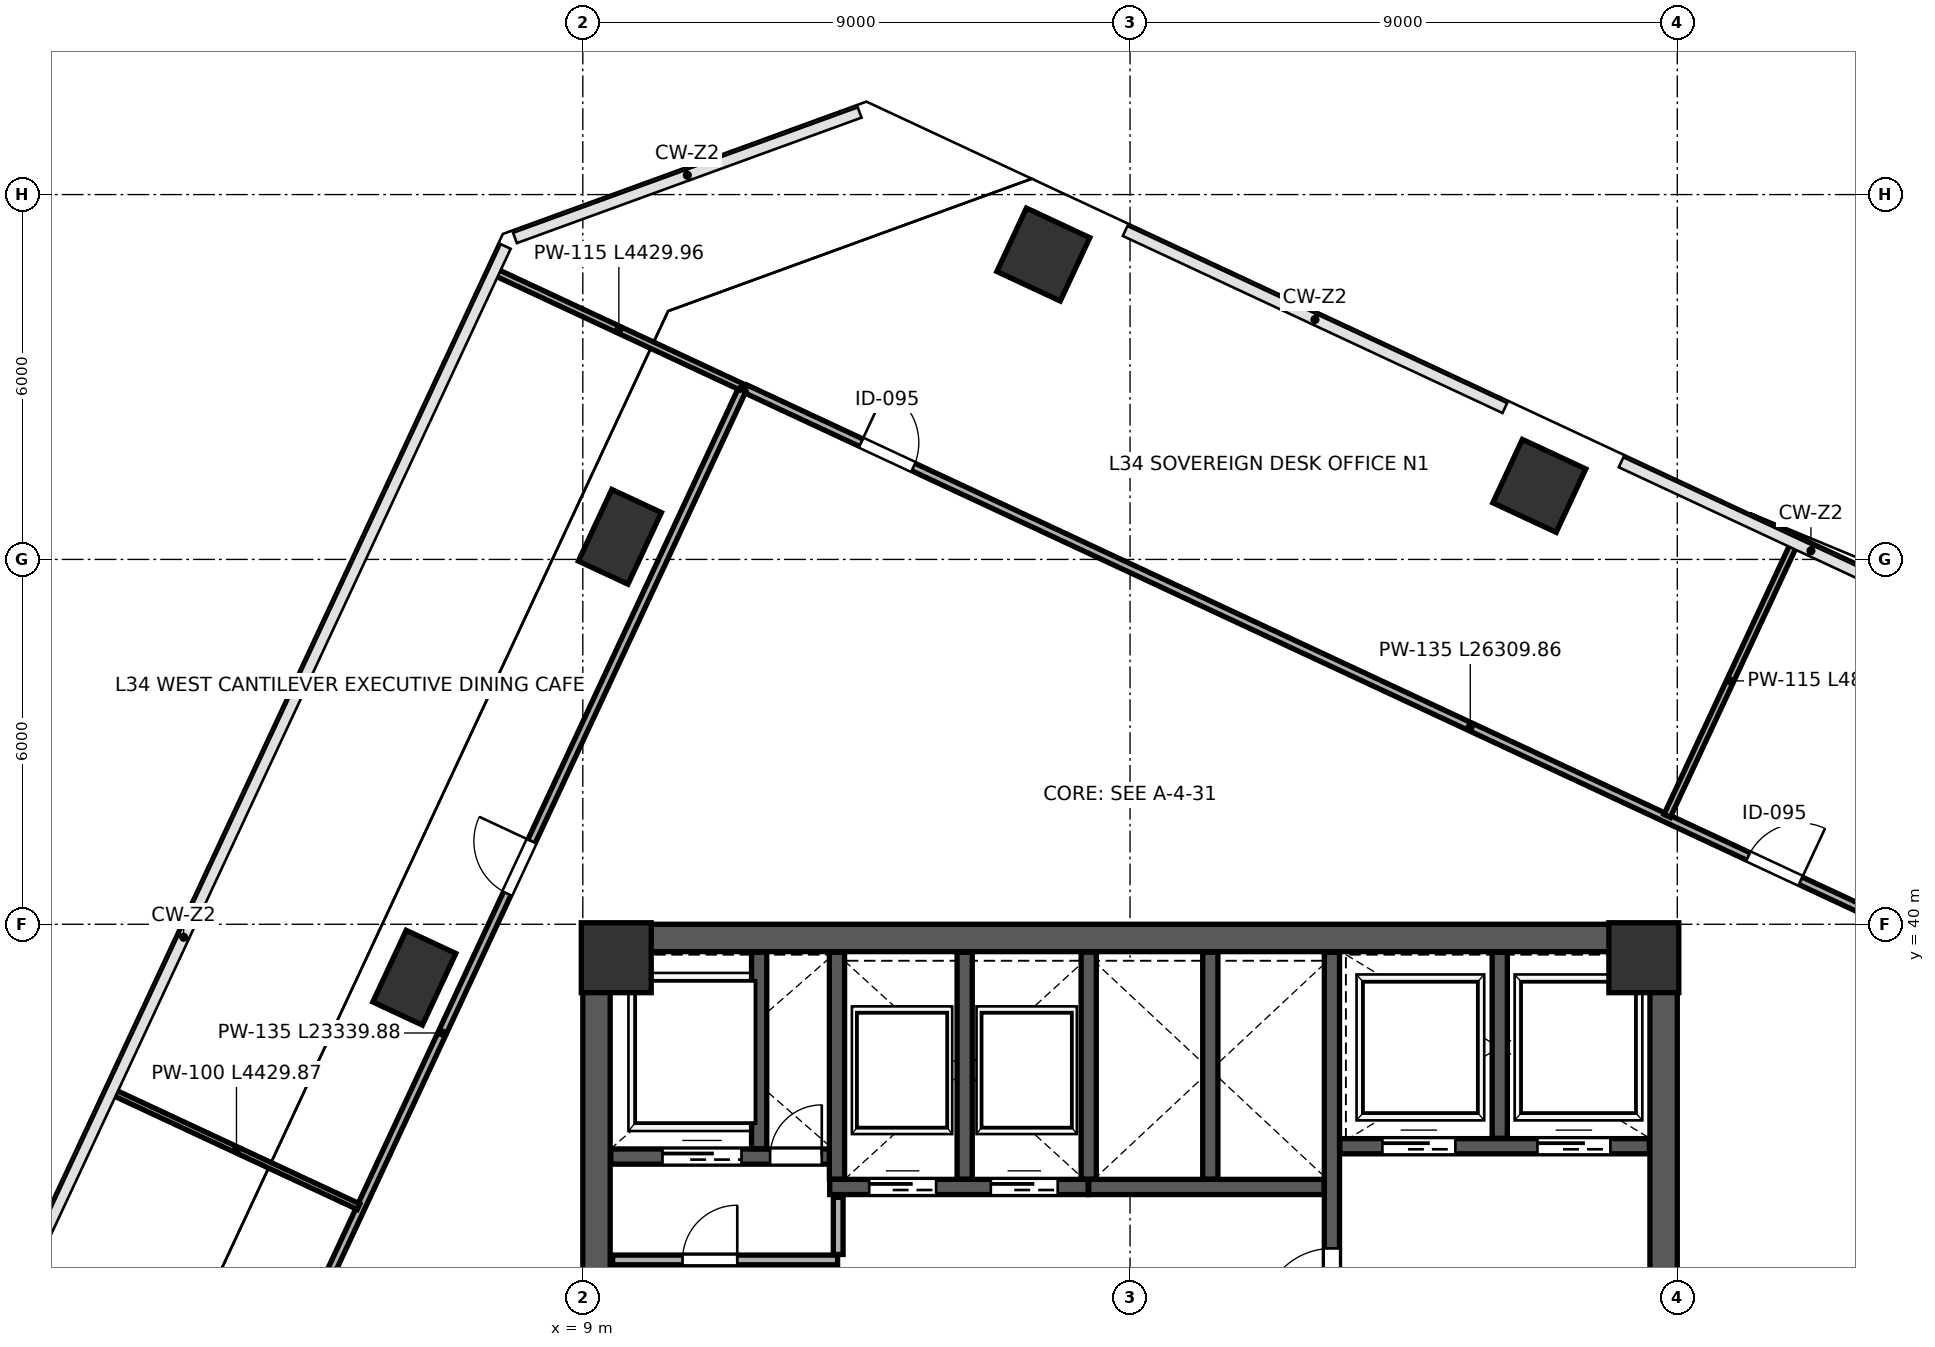
"""IFC4 building model, lengths in metres.
Left out: names, types, materials, properties, quantities, classifications, styles, units other than length and angle.
Written with IfcOpenShell. Run it as: python <this file> out.ifc"""

import sys

from ifc_helpers import new_model, si_unit, direction, frame, frame_2d, origin, origin_2d, place, context, subcontext, project, spatial, rectangle, extrude, source, transform, mapped, element, fill, save


model = new_model("IFC4")
c1 = context("Model", 3, precision=1e-05, world=origin(), true_north=direction((0.0, 1.0)))
c2 = subcontext(c1, "Body", "Model", "MODEL_VIEW")
j1 = project(units=[si_unit("LENGTHUNIT", "METRE"), si_unit("PLANEANGLEUNIT", "RADIAN")], contexts=[c1])
p1 = place(None, origin())
s1 = spatial("IfcSite", under=j1, at=p1, CompositionType="ELEMENT")
p2 = place(p1, origin())
s2 = spatial("IfcBuilding", under=s1, at=p2, CompositionType="ELEMENT")
p3 = place(p2, frame((0.0, 0.0, 154.0)))
s3 = spatial("IfcBuildingStorey", under=s2, at=p3, CompositionType="ELEMENT", Elevation=154.0)
m1 = source(origin(), c2, "Body", "SweptSolid", [
    extrude(rectangle(XDim=1.15, YDim=1.15, at=origin_2d()), origin(), (0.0, 0.0, 1.0), 4.198),
])
for number, where, z_axis, x_axis in (
    (1, (9.55, 39.45, 0.001), (0.0, 0.0, 1.0), (1.0, 0.0, 0.0)),
    (2, (26.45, 39.45, 0.001), (0.0, 0.0, 1.0), (1.0, 0.0, 0.0)),
):
    element("IfcColumn", number, at=place(p3, frame(where, z_axis=z_axis, x_axis=x_axis)), inside=s3, PredefinedType="COLUMN", context=c2, shape_type="MappedRepresentation", body=[
        mapped(m1, transform((0.0, 0.0, 0.0), scale=1.0)),
    ])
m2 = source(origin(), c2, "Body", "SweptSolid", [
    extrude(rectangle(XDim=1.15, YDim=1.15, at=origin_2d()), origin(), (0.0, 0.0, 1.0), 4.198),
])
for number, where, z_axis, x_axis in (
    (3, (16.574, 51.013, 0.001), (0.0, 0.0, 1.0), (-0.906, 0.423, 0.0)),
    (4, (24.731, 47.21, 0.001), (0.0, 0.0, 1.0), (-0.906, 0.423, 0.0)),
):
    element("IfcColumn", number, at=place(p3, frame(where, z_axis=z_axis, x_axis=x_axis)), inside=s3, PredefinedType="COLUMN", context=c2, shape_type="MappedRepresentation", body=[
        mapped(m2, transform((0.0, 0.0, 0.0), scale=1.0)),
    ])
m3 = source(origin(), c2, "Body", "SweptSolid", [
    extrude(rectangle(XDim=0.9, YDim=1.3, at=origin_2d()), origin(), (0.0, 0.0, 1.0), 4.198),
])
for number, where, z_axis, x_axis in (
    (5, (6.229, 39.121, 0.001), (0.0, 0.0, 1.0), (-0.906, 0.423, 0.0)),
    (6, (9.61, 46.372, 0.001), (0.0, 0.0, 1.0), (-0.906, 0.423, 0.0)),
):
    element("IfcColumn", number, at=place(p3, frame(where, z_axis=z_axis, x_axis=x_axis)), inside=s3, PredefinedType="PILASTER", context=c2, shape_type="MappedRepresentation", body=[
        mapped(m3, transform((0.0, 0.0, 0.0), scale=1.0)),
    ])
p4 = place(p3, frame((9.225, 24.45, 0.0), z_axis=(0.0, 0.0, 1.0), x_axis=(0.0, 1.0, 0.0)))
e7 = element("IfcWall", 7, at=p4, inside=s3, PredefinedType="SHEAR", context=c2, shape_type="SweptSolid", body=[
    extrude(rectangle(XDim=15.1, YDim=0.45, at=frame_2d((7.55, 0.0))), origin(), (0.0, 0.0, 1.0), 3.96),
])
p5 = place(p3, frame((26.775, 24.45, 0.0), z_axis=(0.0, 0.0, 1.0), x_axis=(0.0, 1.0, 0.0)))
e8 = element("IfcWall", 8, at=p5, inside=s3, PredefinedType="SHEAR", context=c2, shape_type="SweptSolid", body=[
    extrude(rectangle(XDim=15.1, YDim=0.45, at=frame_2d((7.55, 0.0))), origin(), (0.0, 0.0, 1.0), 3.96),
])
p6 = place(p5, frame((8.6, 0.0, 0.0)))
e9 = element("IfcOpeningElement", 9, at=p6, cuts=e8, PredefinedType="OPENING", context=c2, shape_type="SweptSolid", body=[
    extrude(rectangle(XDim=1.15, YDim=2.2, at=frame_2d((0.575, 1.1))), frame((0.0, 0.235, 0.0), z_axis=(0.0, -1.0, 0.0), x_axis=(1.0, 0.0, 0.0)), (0.0, 0.0, 1.0), 0.47),
])
p7 = place(p3, frame((9.0, 39.775, 0.0), z_axis=(0.0, 0.0, 1.0), x_axis=(1.0, 0.0, 0.0)))
e10 = element("IfcWall", 10, at=p7, inside=s3, PredefinedType="SHEAR", context=c2, shape_type="SweptSolid", body=[
    extrude(rectangle(XDim=18.0, YDim=0.45, at=frame_2d((9.0, 0.0))), origin(), (0.0, 0.0, 1.0), 3.96),
])
p8 = place(p3, frame((21.32, 32.12, 0.0), z_axis=(0.0, 0.0, 1.0), x_axis=(0.0, 1.0, 0.0)))
e11 = element("IfcWall", 11, at=p8, inside=s3, PredefinedType="SHEAR", context=c2, shape_type="SweptSolid", body=[
    extrude(rectangle(XDim=7.42, YDim=0.25, at=frame_2d((3.71, 0.0))), origin(), (0.0, 0.0, 1.0), 3.96),
])
p9 = place(p8, frame((1.4, 0.0, 0.0)))
e12 = element("IfcOpeningElement", 12, at=p9, cuts=e11, PredefinedType="OPENING", context=c2, shape_type="SweptSolid", body=[
    extrude(rectangle(XDim=1.15, YDim=2.2, at=frame_2d((0.575, 1.1))), frame((0.0, 0.135, 0.0), z_axis=(0.0, -1.0, 0.0), x_axis=(1.0, 0.0, 0.0)), (0.0, 0.0, 1.0), 0.27),
])
p10 = place(p3, frame((9.46, 36.18, 0.0), z_axis=(0.0, 0.0, 1.0), x_axis=(1.0, 0.0, 0.0)))
e13 = element("IfcWall", 13, at=p10, inside=s3, PredefinedType="SHEAR", context=c2, shape_type="SweptSolid", body=[
    extrude(rectangle(XDim=3.79, YDim=0.25, at=frame_2d((1.895, 0.0))), origin(), (0.0, 0.0, 1.0), 3.96),
])
p11 = place(p10, frame((2.62, 0.0, 0.0)))
e14 = element("IfcOpeningElement", 14, at=p11, cuts=e13, PredefinedType="OPENING", context=c2, shape_type="SweptSolid", body=[
    extrude(rectangle(XDim=0.85, YDim=2.1, at=frame_2d((0.425, 1.05))), frame((0.0, 0.135, 0.0), z_axis=(0.0, -1.0, 0.0), x_axis=(1.0, 0.0, 0.0)), (0.0, 0.0, 1.0), 0.27),
])
p12 = place(p10, frame((0.85, 0.0, 0.0)))
e15 = element("IfcOpeningElement", 15, at=p12, cuts=e13, PredefinedType="OPENING", context=c2, shape_type="SweptSolid", body=[
    extrude(rectangle(XDim=1.3, YDim=2.25, at=frame_2d((0.65, 1.125))), frame((0.0, 0.135, 0.0), z_axis=(0.0, -1.0, 0.0), x_axis=(1.0, 0.0, 0.0)), (0.0, 0.0, 1.0), 0.27),
])
p13 = place(p3, frame((11.9, 36.31, 0.0), z_axis=(0.0, 0.0, 1.0), x_axis=(0.0, 1.0, 0.0)))
e16 = element("IfcWall", 16, at=p13, inside=s3, PredefinedType="SHEAR", context=c2, shape_type="SweptSolid", body=[
    extrude(rectangle(XDim=3.23, YDim=0.25, at=frame_2d((1.615, 0.0))), origin(), (0.0, 0.0, 1.0), 3.96),
])
p14 = place(p3, frame((21.45, 36.35, 0.0), z_axis=(0.0, 0.0, 1.0), x_axis=(1.0, 0.0, 0.0)))
e17 = element("IfcWall", 17, at=p14, inside=s3, PredefinedType="SHEAR", context=c2, shape_type="SweptSolid", body=[
    extrude(rectangle(XDim=5.09, YDim=0.25, at=frame_2d((2.545, 0.0))), origin(), (0.0, 0.0, 1.0), 3.96),
])
p15 = place(p14, frame((0.7, 0.0, 0.0)))
e18 = element("IfcOpeningElement", 18, at=p15, cuts=e17, PredefinedType="OPENING", context=c2, shape_type="SweptSolid", body=[
    extrude(rectangle(XDim=1.2, YDim=2.2, at=frame_2d((0.6, 1.1))), frame((0.0, 0.135, 0.0), z_axis=(0.0, -1.0, 0.0), x_axis=(1.0, 0.0, 0.0)), (0.0, 0.0, 1.0), 0.27),
])
p16 = place(p14, frame((3.25, 0.0, 0.0)))
e19 = element("IfcOpeningElement", 19, at=p16, cuts=e17, PredefinedType="OPENING", context=c2, shape_type="SweptSolid", body=[
    extrude(rectangle(XDim=1.2, YDim=2.2, at=frame_2d((0.6, 1.1))), frame((0.0, 0.135, 0.0), z_axis=(0.0, -1.0, 0.0), x_axis=(1.0, 0.0, 0.0)), (0.0, 0.0, 1.0), 0.27),
])
p17 = place(p3, frame((24.08, 36.48, 0.0), z_axis=(0.0, 0.0, 1.0), x_axis=(0.0, 1.0, 0.0)))
e20 = element("IfcWall", 20, at=p17, inside=s3, PredefinedType="SHEAR", context=c2, shape_type="SweptSolid", body=[
    extrude(rectangle(XDim=3.06, YDim=0.25, at=frame_2d((1.53, 0.0))), origin(), (0.0, 0.0, 1.0), 3.96),
])
p18 = place(p3, frame((13.06, 35.68, 0.0), z_axis=(0.0, 0.0, 1.0), x_axis=(1.0, 0.0, 0.0)))
e21 = element("IfcWall", 21, at=p18, inside=s3, PredefinedType="SHEAR", context=c2, shape_type="SweptSolid", body=[
    extrude(rectangle(XDim=4.25, YDim=0.25, at=frame_2d((2.125, 0.0))), origin(), (0.0, 0.0, 1.0), 3.96),
])
p19 = place(p18, frame((0.65, 0.0, 0.0)))
e22 = element("IfcOpeningElement", 22, at=p19, cuts=e21, PredefinedType="OPENING", context=c2, shape_type="SweptSolid", body=[
    extrude(rectangle(XDim=1.1, YDim=2.2, at=frame_2d((0.55, 1.1))), frame((0.0, 0.135, 0.0), z_axis=(0.0, -1.0, 0.0), x_axis=(1.0, 0.0, 0.0)), (0.0, 0.0, 1.0), 0.27),
])
p20 = place(p18, frame((2.65, 0.0, 0.0)))
e23 = element("IfcOpeningElement", 23, at=p20, cuts=e21, PredefinedType="OPENING", context=c2, shape_type="SweptSolid", body=[
    extrude(rectangle(XDim=1.1, YDim=2.2, at=frame_2d((0.55, 1.1))), frame((0.0, 0.135, 0.0), z_axis=(0.0, -1.0, 0.0), x_axis=(1.0, 0.0, 0.0)), (0.0, 0.0, 1.0), 0.27),
])
for number, where, z_axis, x_axis in (
    (24, (13.18, 35.81, 0.0), (0.0, 0.0, 1.0), (0.0, 1.0, 0.0)),
    (25, (15.28, 35.81, 0.0), (0.0, 0.0, 1.0), (0.0, 1.0, 0.0)),
):
    element("IfcWall", number, at=place(p3, frame(where, z_axis=z_axis, x_axis=x_axis)), inside=s3, PredefinedType="SHEAR", context=c2, shape_type="SweptSolid", body=[
        extrude(rectangle(XDim=3.73, YDim=0.25, at=frame_2d((1.865, 0.0))), origin(), (0.0, 0.0, 1.0), 3.96),
    ])
p21 = place(p3, frame((17.32, 35.68, 0.0), z_axis=(0.0, 0.0, 1.0), x_axis=(1.0, 0.0, 0.0)))
e26 = element("IfcWall", 26, at=p21, inside=s3, PredefinedType="SHEAR", context=c2, shape_type="SweptSolid", body=[
    extrude(rectangle(XDim=3.87, YDim=0.25, at=frame_2d((1.935, 0.0))), origin(), (0.0, 0.0, 1.0), 3.96),
])
for number, where, z_axis, x_axis in (
    (27, (17.32, 35.81, 0.0), (0.0, 0.0, 1.0), (0.0, 1.0, 0.0)),
    (28, (19.32, 35.81, 0.0), (0.0, 0.0, 1.0), (0.0, 1.0, 0.0)),
):
    element("IfcWall", number, at=place(p3, frame(where, z_axis=z_axis, x_axis=x_axis)), inside=s3, PredefinedType="SHEAR", context=c2, shape_type="SweptSolid", body=[
        extrude(rectangle(XDim=3.73, YDim=0.25, at=frame_2d((1.865, 0.0))), origin(), (0.0, 0.0, 1.0), 3.96),
    ])
p22 = place(p3, frame((9.49, 34.48, 0.0), z_axis=(0.0, 0.0, 1.0), x_axis=(1.0, 0.0, 0.0)))
e29 = element("IfcWall", 29, at=p22, inside=s3, PredefinedType="PARTITIONING", context=c2, shape_type="SweptSolid", body=[
    extrude(rectangle(XDim=3.7, YDim=0.16, at=frame_2d((1.85, 0.0))), origin(), (0.0, 0.0, 1.0), 3.96),
])
p23 = place(p22, frame((1.15, 0.0, 0.0)))
e30 = element("IfcOpeningElement", 30, at=p23, cuts=e29, PredefinedType="OPENING", context=c2, shape_type="SweptSolid", body=[
    extrude(rectangle(XDim=0.9, YDim=2.15, at=frame_2d((0.45, 1.075))), frame((0.0, 0.09, 0.0), z_axis=(0.0, -1.0, 0.0), x_axis=(1.0, 0.0, 0.0)), (0.0, 0.0, 1.0), 0.18),
])
p24 = place(p3, frame((13.2, 34.57, 0.0), z_axis=(0.0, 0.0, 1.0), x_axis=(0.0, 1.0, 0.0)))
e31 = element("IfcWall", 31, at=p24, inside=s3, PredefinedType="PARTITIONING", context=c2, shape_type="SweptSolid", body=[
    extrude(rectangle(XDim=0.94, YDim=0.16, at=frame_2d((0.47, 0.0))), origin(), (0.0, 0.0, 1.0), 3.96),
])
p25 = place(p3, frame((11.673, 48.808, 0.0), z_axis=(0.0, 0.0, 1.0), x_axis=(0.906307085664, -0.422619765836, 0.0)))
e32 = element("IfcWall", 32, at=p25, inside=s3, PredefinedType="PARTITIONING", context=c2, shape_type="SweptSolid", body=[
    extrude(rectangle(XDim=26.31, YDim=0.135, at=frame_2d((13.155, 0.0))), origin(), (0.0, 0.0, 1.0), 3.96),
])
p26 = place(p25, frame((2.1, 0.0, 0.0)))
e33 = element("IfcOpeningElement", 33, at=p26, cuts=e32, PredefinedType="OPENING", context=c2, shape_type="SweptSolid", body=[
    extrude(rectangle(XDim=0.95, YDim=2.15, at=frame_2d((0.475, 1.075))), frame((0.0, 0.078, 0.0), z_axis=(0.0, -1.0, 0.0), x_axis=(1.0, 0.0, 0.0)), (0.0, 0.0, 1.0), 0.155),
])
p27 = place(p25, frame((18.2, 0.0, 0.0)))
e34 = element("IfcOpeningElement", 34, at=p27, cuts=e32, PredefinedType="OPENING", context=c2, shape_type="SweptSolid", body=[
    extrude(rectangle(XDim=0.95, YDim=2.15, at=frame_2d((0.475, 1.075))), frame((0.0, 0.078, 0.0), z_axis=(0.0, -1.0, 0.0), x_axis=(1.0, 0.0, 0.0)), (0.0, 0.0, 1.0), 0.155),
])
p28 = place(p3, frame((26.834, 41.782, 0.0), z_axis=(0.0, 0.0, 1.0), x_axis=(0.422631768009, 0.906301488838, 0.0)))
e35 = element("IfcWall", 35, at=p28, inside=s3, PredefinedType="PARTITIONING", context=c2, shape_type="SweptSolid", body=[
    extrude(rectangle(XDim=4.9, YDim=0.115, at=frame_2d((2.45, 0.0))), origin(), (0.0, 0.0, 1.0), 3.195),
])
p29 = place(p3, frame((1.756, 27.635, 0.0), z_axis=(0.0, 0.0, 1.0), x_axis=(0.422615732035, 0.906308966653, 0.0)))
e36 = element("IfcWall", 36, at=p29, inside=s3, PredefinedType="PARTITIONING", context=c2, shape_type="SweptSolid", body=[
    extrude(rectangle(XDim=23.34, YDim=0.135, at=frame_2d((11.67, 0.0))), origin(), (0.0, 0.0, 1.0), 3.96),
])
p30 = place(p29, frame((1.3, 0.0, 0.0)))
e37 = element("IfcOpeningElement", 37, at=p30, cuts=e36, PredefinedType="OPENING", context=c2, shape_type="SweptSolid", body=[
    extrude(rectangle(XDim=0.95, YDim=2.15, at=frame_2d((0.475, 1.075))), frame((0.0, 0.078, 0.0), z_axis=(0.0, -1.0, 0.0), x_axis=(1.0, 0.0, 0.0)), (0.0, 0.0, 1.0), 0.155),
])
p31 = place(p29, frame((14.2, 0.0, 0.0)))
e38 = element("IfcOpeningElement", 38, at=p31, cuts=e36, PredefinedType="OPENING", context=c2, shape_type="SweptSolid", body=[
    extrude(rectangle(XDim=0.95, YDim=2.15, at=frame_2d((0.475, 1.075))), frame((0.0, 0.078, 0.0), z_axis=(0.0, -1.0, 0.0), x_axis=(1.0, 0.0, 0.0)), (0.0, 0.0, 1.0), 0.155),
])
p32 = place(p3, frame((7.585, 50.714, 0.0), z_axis=(0.0, 0.0, 1.0), x_axis=(0.906295742894, -0.422644089526, 0.0)))
e39 = element("IfcWall", 39, at=p32, inside=s3, PredefinedType="PARTITIONING", context=c2, shape_type="SweptSolid", body=[
    extrude(rectangle(XDim=4.43, YDim=0.115, at=frame_2d((2.215, 0.0))), origin(), (0.0, 0.0, 1.0), 3.96),
])
p33 = place(p3, frame((1.297, 37.228, 0.0), z_axis=(0.0, 0.0, 1.0), x_axis=(0.906295742894, -0.422644089526, 0.0)))
e40 = element("IfcWall", 40, at=p33, inside=s3, PredefinedType="PARTITIONING", context=c2, shape_type="SweptSolid", body=[
    extrude(rectangle(XDim=4.43, YDim=0.1, at=frame_2d((2.215, 0.0))), origin(), (0.0, 0.0, 1.0), 3.195),
])
m4 = source(origin(), c2, "Body", "SweptSolid", [
    extrude(rectangle(XDim=1.15, YDim=2.2, at=frame_2d((0.575, 1.1))), frame((0.0, 0.025, 0.0), z_axis=(0.0, -1.0, 0.0), x_axis=(1.0, 0.0, 0.0)), (0.0, 0.0, 1.0), 0.05),
])
p34 = place(p9, origin())
e41 = element("IfcDoor", 41, at=p34, inside=s3, OperationType="SINGLE_SWING_LEFT", PredefinedType="DOOR", context=c2, shape_type="MappedRepresentation", body=[
    mapped(m4, transform((0.0, 0.0, 0.0), scale=1.0)),
])
fill(e12, e41)
m5 = source(origin(), c2, "Body", "SweptSolid", [
    extrude(rectangle(XDim=0.85, YDim=2.1, at=frame_2d((0.425, 1.05))), frame((0.0, 0.025, 0.0), z_axis=(0.0, -1.0, 0.0), x_axis=(1.0, 0.0, 0.0)), (0.0, 0.0, 1.0), 0.05),
])
p35 = place(p11, origin())
e42 = element("IfcDoor", 42, at=p35, inside=s3, OperationType="SINGLE_SWING_RIGHT", PredefinedType="DOOR", context=c2, shape_type="MappedRepresentation", body=[
    mapped(m5, transform((0.0, 0.0, 0.0), scale=1.0)),
])
fill(e14, e42)
m6 = source(origin(), c2, "Body", "SweptSolid", [
    extrude(rectangle(XDim=1.1, YDim=2.2, at=frame_2d((0.55, 1.1))), frame((0.0, 0.025, 0.0), z_axis=(0.0, -1.0, 0.0), x_axis=(1.0, 0.0, 0.0)), (0.0, 0.0, 1.0), 0.05),
])
p36 = place(p19, origin())
e43 = element("IfcDoor", 43, at=p36, inside=s3, OperationType="SLIDING_TO_LEFT", PredefinedType="DOOR", context=c2, shape_type="MappedRepresentation", body=[
    mapped(m6, transform((0.0, 0.0, 0.0), scale=1.0)),
])
fill(e22, e43)
p37 = place(p20, origin())
e44 = element("IfcDoor", 44, at=p37, inside=s3, OperationType="SLIDING_TO_RIGHT", PredefinedType="DOOR", context=c2, shape_type="MappedRepresentation", body=[
    mapped(m6, transform((0.0, 0.0, 0.0), scale=1.0)),
])
fill(e23, e44)
m7 = source(origin(), c2, "Body", "SweptSolid", [
    extrude(rectangle(XDim=1.2, YDim=2.2, at=frame_2d((0.6, 1.1))), frame((0.0, 0.025, 0.0), z_axis=(0.0, -1.0, 0.0), x_axis=(1.0, 0.0, 0.0)), (0.0, 0.0, 1.0), 0.05),
])
p38 = place(p15, origin())
e45 = element("IfcDoor", 45, at=p38, inside=s3, OperationType="SLIDING_TO_LEFT", PredefinedType="DOOR", context=c2, shape_type="MappedRepresentation", body=[
    mapped(m7, transform((0.0, 0.0, 0.0), scale=1.0)),
])
fill(e18, e45)
p39 = place(p16, origin())
e46 = element("IfcDoor", 46, at=p39, inside=s3, OperationType="SLIDING_TO_RIGHT", PredefinedType="DOOR", context=c2, shape_type="MappedRepresentation", body=[
    mapped(m7, transform((0.0, 0.0, 0.0), scale=1.0)),
])
fill(e19, e46)
m8 = source(origin(), c2, "Body", "SweptSolid", [
    extrude(rectangle(XDim=1.3, YDim=2.25, at=frame_2d((0.65, 1.125))), frame((0.0, 0.025, 0.0), z_axis=(0.0, -1.0, 0.0), x_axis=(1.0, 0.0, 0.0)), (0.0, 0.0, 1.0), 0.05),
])
p40 = place(p12, origin())
e47 = element("IfcDoor", 47, at=p40, inside=s3, OperationType="SLIDING_TO_LEFT", PredefinedType="DOOR", context=c2, shape_type="MappedRepresentation", body=[
    mapped(m8, transform((0.0, 0.0, 0.0), scale=1.0)),
])
fill(e15, e47)
m9 = source(origin(), c2, "Body", "SweptSolid", [
    extrude(rectangle(XDim=0.9, YDim=2.15, at=frame_2d((0.45, 1.075))), frame((0.0, 0.025, 0.0), z_axis=(0.0, -1.0, 0.0), x_axis=(1.0, 0.0, 0.0)), (0.0, 0.0, 1.0), 0.05),
])
p41 = place(p23, origin())
e48 = element("IfcDoor", 48, at=p41, inside=s3, OperationType="SINGLE_SWING_RIGHT", PredefinedType="DOOR", context=c2, shape_type="MappedRepresentation", body=[
    mapped(m9, transform((0.0, 0.0, 0.0), scale=1.0)),
])
fill(e30, e48)
m10 = source(origin(), c2, "Body", "SweptSolid", [
    extrude(rectangle(XDim=0.95, YDim=2.15, at=frame_2d((0.475, 1.075))), frame((0.0, 0.025, 0.0), z_axis=(0.0, -1.0, 0.0), x_axis=(1.0, 0.0, 0.0)), (0.0, 0.0, 1.0), 0.05),
])
p42 = place(p26, origin())
e49 = element("IfcDoor", 49, at=p42, inside=s3, OperationType="SINGLE_SWING_LEFT", PredefinedType="DOOR", context=c2, shape_type="MappedRepresentation", body=[
    mapped(m10, transform((0.0, 0.0, 0.0), scale=1.0)),
])
fill(e33, e49)
p43 = place(p27, origin())
e50 = element("IfcDoor", 50, at=p43, inside=s3, OperationType="SINGLE_SWING_RIGHT", PredefinedType="DOOR", context=c2, shape_type="MappedRepresentation", body=[
    mapped(m10, transform((0.0, 0.0, 0.0), scale=1.0)),
])
fill(e34, e50)
p44 = place(p31, origin())
e51 = element("IfcDoor", 51, at=p44, inside=s3, OperationType="SINGLE_SWING_RIGHT", PredefinedType="DOOR", context=c2, shape_type="MappedRepresentation", body=[
    mapped(m10, transform((0.0, 0.0, 0.0), scale=1.0)),
])
fill(e38, e51)
save(model, sys.argv[1])
